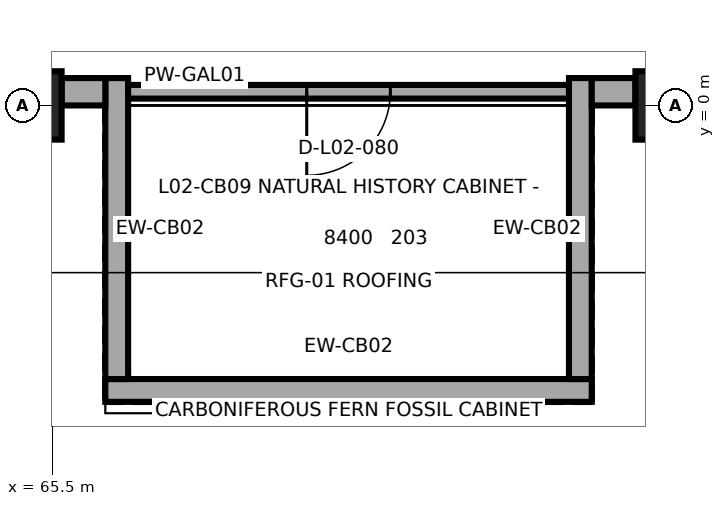
"""IFC4 building model, lengths in metres.
Left out: names, types, materials, properties, quantities, classifications, styles, units other than length and angle.
Written with IfcOpenShell. Run it as: python <this file> out.ifc"""

import sys

from ifc_helpers import new_model, si_unit, direction, frame, frame_2d, origin, origin_2d, place, context, subcontext, project, spatial, rectangle, extrude, element, fill, save


model = new_model("IFC4")
c1 = context("Model", 3, precision=1e-05, world=origin(), true_north=direction((0.0, 1.0)))
c2 = subcontext(c1, "Body", "Model", "MODEL_VIEW")
j1 = project(units=[si_unit("LENGTHUNIT", "METRE"), si_unit("PLANEANGLEUNIT", "RADIAN")], contexts=[c1])
p1 = place(None, origin())
s1 = spatial("IfcSite", under=j1, at=p1, CompositionType="ELEMENT")
p2 = place(p1, origin())
s2 = spatial("IfcBuilding", under=s1, at=p2, CompositionType="ELEMENT")
p3 = place(p2, frame((0.0, 0.0, 12.9)))
s3 = spatial("IfcBuildingStorey", under=s2, at=p3, CompositionType="ELEMENT", Elevation=12.9)
for number, where, z_axis, x_axis in (
    (1, (65.2, 0.0, 0.0), (0.0, 0.0, 1.0), (1.0, 0.0, 0.0)),
    (2, (73.6, 0.0, 0.0), (0.0, 0.0, 1.0), (1.0, 0.0, 0.0)),
):
    element("IfcColumn", number, at=place(p3, frame(where, z_axis=z_axis, x_axis=x_axis)), inside=s3, PredefinedType="COLUMN", context=c2, shape_type="SweptSolid", body=[
        extrude(rectangle(XDim=0.85, YDim=0.9, at=origin_2d()), origin(), (0.0, 0.0, 1.0), 4.5),
    ])
p4 = place(p3, frame((66.2, -3.75, 0.0), z_axis=(0.0, 0.0, 1.0), x_axis=(1.0, 0.0, 0.0)))
e3 = element("IfcWall", 3, at=p4, inside=s3, PredefinedType="SOLIDWALL", context=c2, shape_type="SweptSolid", body=[
    extrude(rectangle(XDim=6.4, YDim=0.3, at=frame_2d((3.2, 0.0))), origin(), (0.0, 0.0, 1.0), 2.99),
])
for number, where, z_axis, x_axis in (
    (4, (66.35, 0.36, 0.0), (0.0, 0.0, 1.0), (0.0, -1.0, 0.0)),
    (5, (72.45, -3.6, 0.0), (0.0, 0.0, 1.0), (0.0, 1.0, 0.0)),
):
    element("IfcWall", number, at=place(p3, frame(where, z_axis=z_axis, x_axis=x_axis)), inside=s3, PredefinedType="SOLIDWALL", context=c2, shape_type="SweptSolid", body=[
        extrude(rectangle(XDim=3.96, YDim=0.3, at=frame_2d((1.98, 0.0))), origin(), (0.0, 0.0, 1.0), 2.99),
    ])
for number, where, z_axis, x_axis in (
    (6, (65.625, 0.18, 0.0), (0.0, 0.0, 1.0), (1.0, 0.0, 0.0)),
    (7, (72.6, 0.18, 0.0), (0.0, 0.0, 1.0), (1.0, 0.0, 0.0)),
):
    element("IfcWall", number, at=place(p3, frame(where, z_axis=z_axis, x_axis=x_axis)), inside=s3, PredefinedType="SOLIDWALL", context=c2, shape_type="SweptSolid", body=[
        extrude(rectangle(XDim=0.575, YDim=0.36, at=frame_2d((0.288, 0.0))), origin(), (0.0, 0.0, 1.0), 3.335),
    ])
p5 = place(p3, frame((66.5, 0.18, 0.0), z_axis=(0.0, 0.0, 1.0), x_axis=(1.0, 0.0, 0.0)))
e8 = element("IfcWall", 8, at=p5, inside=s3, PredefinedType="PARTITIONING", context=c2, shape_type="SweptSolid", body=[
    extrude(rectangle(XDim=5.8, YDim=0.18, at=frame_2d((2.9, 0.0))), origin(), (0.0, 0.0, 1.0), 2.99),
])
p6 = place(p5, frame((2.35, 0.0, 0.0)))
e9 = element("IfcOpeningElement", 9, at=p6, cuts=e8, PredefinedType="OPENING", context=c2, shape_type="SweptSolid", body=[
    extrude(rectangle(XDim=1.1, YDim=2.2, at=frame_2d((0.55, 1.1))), frame((0.0, 0.1, 0.0), z_axis=(0.0, -1.0, 0.0), x_axis=(1.0, 0.0, 0.0)), (0.0, 0.0, 1.0), 0.2),
])
p7 = place(p6, origin())
e10 = element("IfcDoor", 10, at=p7, inside=s3, OperationType="SINGLE_SWING_RIGHT", PredefinedType="DOOR", context=c2, shape_type="SweptSolid", body=[
    extrude(rectangle(XDim=1.1, YDim=2.2, at=frame_2d((0.55, 1.1))), frame((0.0, 0.025, 0.0), z_axis=(0.0, -1.0, 0.0), x_axis=(1.0, 0.0, 0.0)), (0.0, 0.0, 1.0), 0.05),
])
fill(e9, e10)
save(model, sys.argv[1])
